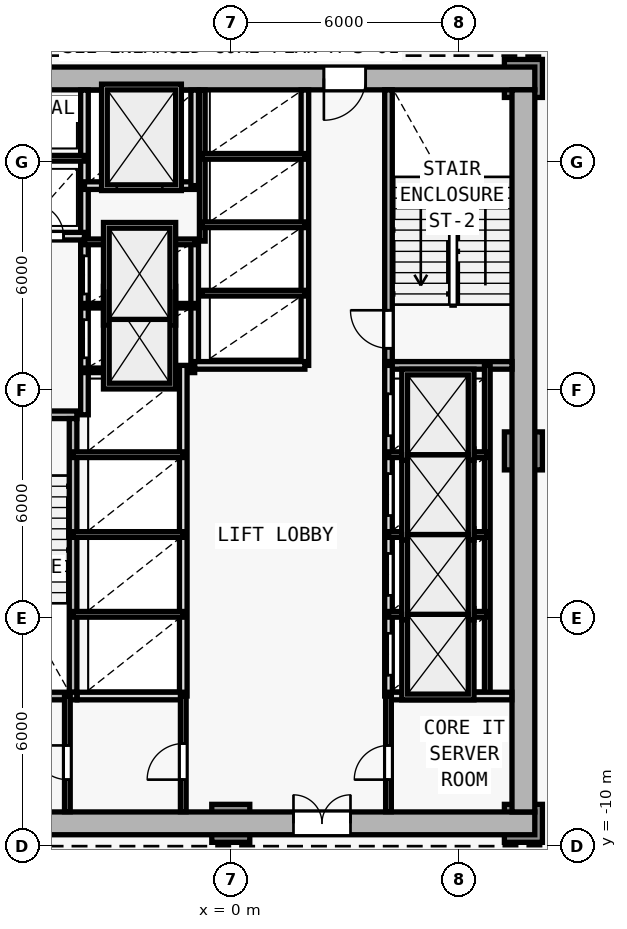
"""IFC4 building model, lengths in metres.
Left out: names, types, materials, properties, quantities, classifications, styles, units other than length and angle.
Written with IfcOpenShell. Run it as: python <this file> out.ifc"""

import sys

from ifc_helpers import new_model, si_unit, direction, frame, frame_2d, origin, origin_2d, place, context, subcontext, project, spatial, rectangle, extrude, element, fill, save


model = new_model("IFC4")
c1 = context("Model", 3, precision=1e-05, world=origin(), true_north=direction((0.0, 1.0)))
c2 = subcontext(c1, "Body", "Model", "MODEL_VIEW")
j1 = project(units=[si_unit("LENGTHUNIT", "METRE"), si_unit("PLANEANGLEUNIT", "RADIAN")], contexts=[c1])
p1 = place(None, origin())
s1 = spatial("IfcSite", under=j1, at=p1, CompositionType="ELEMENT")
p2 = place(p1, origin())
s2 = spatial("IfcBuilding", under=s1, at=p2, CompositionType="ELEMENT")
p3 = place(p2, frame((0.0, 0.0, 21.8)))
s3 = spatial("IfcBuildingStorey", under=s2, at=p3, CompositionType="ELEMENT", Elevation=21.8)
for number, where, z_axis, x_axis in (
    (1, (7.7, -9.4, 0.0), (0.0, 0.0, 1.0), (1.0, 0.0, 0.0)),
    (2, (7.7, 10.2, 0.0), (0.0, 0.0, 1.0), (1.0, 0.0, 0.0)),
    (3, (0.0, -9.4, 0.0), (0.0, 0.0, 1.0), (1.0, 0.0, 0.0)),
    (4, (7.7, 0.4, 0.0), (0.0, 0.0, 1.0), (1.0, 0.0, 0.0)),
):
    element("IfcColumn", number, at=place(p3, frame(where, z_axis=z_axis, x_axis=x_axis)), inside=s3, PredefinedType="COLUMN", context=c2, shape_type="SweptSolid", body=[
        extrude(rectangle(XDim=1.0, YDim=1.0, at=origin_2d()), origin(), (0.0, 0.0, 1.0), 4.6),
    ])
p4 = place(p3, frame((-8.0, -9.4, 0.0), z_axis=(0.0, 0.0, 1.0), x_axis=(1.0, 0.0, 0.0)))
e5 = element("IfcWall", 5, at=p4, inside=s3, PredefinedType="SHEAR", context=c2, shape_type="SweptSolid", body=[
    extrude(rectangle(XDim=16.0, YDim=0.6, at=frame_2d((8.0, 0.0))), origin(), (0.0, 0.0, 1.0), 4.35),
])
p5 = place(p4, frame((9.65, 0.0, 0.0)))
e6 = element("IfcOpeningElement", 6, at=p5, cuts=e5, PredefinedType="OPENING", context=c2, shape_type="SweptSolid", body=[
    extrude(rectangle(XDim=1.5, YDim=2.2, at=frame_2d((0.75, 1.1))), frame((0.0, 0.31, 0.0), z_axis=(0.0, -1.0, 0.0), x_axis=(1.0, 0.0, 0.0)), (0.0, 0.0, 1.0), 0.62),
])
p6 = place(p3, frame((8.0, 10.2, 0.0), z_axis=(0.0, 0.0, 1.0), x_axis=(-1.0, 0.0, 0.0)))
e7 = element("IfcWall", 7, at=p6, inside=s3, PredefinedType="SHEAR", context=c2, shape_type="SweptSolid", body=[
    extrude(rectangle(XDim=16.0, YDim=0.6, at=frame_2d((8.0, 0.0))), origin(), (0.0, 0.0, 1.0), 4.35),
])
p7 = place(p6, frame((4.45, 0.0, 0.0)))
e8 = element("IfcOpeningElement", 8, at=p7, cuts=e7, PredefinedType="OPENING", context=c2, shape_type="SweptSolid", body=[
    extrude(rectangle(XDim=1.1, YDim=2.15, at=frame_2d((0.55, 1.075))), frame((0.0, 0.31, 0.0), z_axis=(0.0, -1.0, 0.0), x_axis=(1.0, 0.0, 0.0)), (0.0, 0.0, 1.0), 0.62),
])
p8 = place(p3, frame((7.7, 9.9, 0.0), z_axis=(0.0, 0.0, 1.0), x_axis=(0.0, -1.0, 0.0)))
e9 = element("IfcWall", 9, at=p8, inside=s3, PredefinedType="SHEAR", context=c2, shape_type="SweptSolid", body=[
    extrude(rectangle(XDim=19.0, YDim=0.6, at=frame_2d((9.5, 0.0))), origin(), (0.0, 0.0, 1.0), 4.35),
])
p9 = place(p3, frame((-7.4, 1.35, 0.0), z_axis=(0.0, 0.0, 1.0), x_axis=(1.0, 0.0, 0.0)))
e10 = element("IfcWall", 10, at=p9, inside=s3, PredefinedType="SOLIDWALL", context=c2, shape_type="SweptSolid", body=[
    extrude(rectangle(XDim=3.35, YDim=0.2, at=frame_2d((1.675, 0.0))), origin(), (0.0, 0.0, 1.0), 4.35),
])
p10 = place(p9, frame((0.65, 0.0, 0.0)))
e11 = element("IfcOpeningElement", 11, at=p10, cuts=e10, PredefinedType="OPENING", context=c2, shape_type="SweptSolid", body=[
    extrude(rectangle(XDim=1.0, YDim=2.15, at=frame_2d((0.5, 1.075))), frame((0.0, 0.11, 0.0), z_axis=(0.0, -1.0, 0.0), x_axis=(1.0, 0.0, 0.0)), (0.0, 0.0, 1.0), 0.22),
])
p11 = place(p3, frame((-4.15, -5.95, 0.0), z_axis=(0.0, 0.0, 1.0), x_axis=(0.0, 1.0, 0.0)))
e12 = element("IfcWall", 12, at=p11, inside=s3, PredefinedType="SOLIDWALL", context=c2, shape_type="SweptSolid", body=[
    extrude(rectangle(XDim=7.2, YDim=0.2, at=frame_2d((3.6, 0.0))), origin(), (0.0, 0.0, 1.0), 4.35),
])
p12 = place(p3, frame((-3.85, 1.35, 0.0), z_axis=(0.0, 0.0, 1.0), x_axis=(0.0, 1.0, 0.0)))
e13 = element("IfcWall", 13, at=p12, inside=s3, PredefinedType="SOLIDWALL", context=c2, shape_type="SweptSolid", body=[
    extrude(rectangle(XDim=8.545, YDim=0.2, at=frame_2d((4.272, 0.0))), origin(), (0.0, 0.0, 1.0), 4.35),
])
p13 = place(p12, frame((1.5, 0.0, 0.0)))
e14 = element("IfcOpeningElement", 14, at=p13, cuts=e13, PredefinedType="OPENING", context=c2, shape_type="SweptSolid", body=[
    extrude(rectangle(XDim=1.0, YDim=2.15, at=frame_2d((0.5, 1.075))), frame((0.0, 0.11, 0.0), z_axis=(0.0, -1.0, 0.0), x_axis=(1.0, 0.0, 0.0)), (0.0, 0.0, 1.0), 0.22),
])
p14 = place(p12, frame((3.18, 0.0, 0.0)))
e15 = element("IfcOpeningElement", 15, at=p14, cuts=e13, PredefinedType="OPENING", context=c2, shape_type="SweptSolid", body=[
    extrude(rectangle(XDim=1.0, YDim=2.15, at=frame_2d((0.5, 1.075))), frame((0.0, 0.11, 0.0), z_axis=(0.0, -1.0, 0.0), x_axis=(1.0, 0.0, 0.0)), (0.0, 0.0, 1.0), 0.22),
])
p15 = place(p3, frame((-7.395, 6.05, 0.0), z_axis=(0.0, 0.0, 1.0), x_axis=(1.0, 0.0, 0.0)))
e16 = element("IfcWall", 16, at=p15, inside=s3, PredefinedType="SOLIDWALL", context=c2, shape_type="SweptSolid", body=[
    extrude(rectangle(XDim=3.545, YDim=0.2, at=frame_2d((1.772, 0.0))), origin(), (0.0, 0.0, 1.0), 4.35),
])
p16 = place(p15, frame((0.345, 0.0, 0.0)))
e17 = element("IfcOpeningElement", 17, at=p16, cuts=e16, PredefinedType="OPENING", context=c2, shape_type="SweptSolid", body=[
    extrude(rectangle(XDim=0.85, YDim=2.1, at=frame_2d((0.425, 1.05))), frame((0.0, 0.11, 0.0), z_axis=(0.0, -1.0, 0.0), x_axis=(1.0, 0.0, 0.0)), (0.0, 0.0, 1.0), 0.22),
])
p17 = place(p15, frame((2.145, 0.0, 0.0)))
e18 = element("IfcOpeningElement", 18, at=p17, cuts=e16, PredefinedType="OPENING", context=c2, shape_type="SweptSolid", body=[
    extrude(rectangle(XDim=0.85, YDim=2.1, at=frame_2d((0.425, 1.05))), frame((0.0, 0.11, 0.0), z_axis=(0.0, -1.0, 0.0), x_axis=(1.0, 0.0, 0.0)), (0.0, 0.0, 1.0), 0.22),
])
p18 = place(p3, frame((-7.395, 8.1, 0.0), z_axis=(0.0, 0.0, 1.0), x_axis=(1.0, 0.0, 0.0)))
e19 = element("IfcWall", 19, at=p18, inside=s3, PredefinedType="PARTITIONING", context=c2, shape_type="SweptSolid", body=[
    extrude(rectangle(XDim=3.545, YDim=0.15, at=frame_2d((1.772, 0.0))), origin(), (0.0, 0.0, 1.0), 4.35),
])
p19 = place(p3, frame((4.15, 2.75, 0.0), z_axis=(0.0, 0.0, 1.0), x_axis=(0.0, 1.0, 0.0)))
e20 = element("IfcWall", 20, at=p19, inside=s3, PredefinedType="SOLIDWALL", context=c2, shape_type="SweptSolid", body=[
    extrude(rectangle(XDim=7.15, YDim=0.2, at=frame_2d((3.575, 0.0))), origin(), (0.0, 0.0, 1.0), 4.35),
])
p20 = place(p19, frame((0.35, 0.0, 0.0)))
e21 = element("IfcOpeningElement", 21, at=p20, cuts=e20, PredefinedType="OPENING", context=c2, shape_type="SweptSolid", body=[
    extrude(rectangle(XDim=1.0, YDim=2.15, at=frame_2d((0.5, 1.075))), frame((0.0, 0.11, 0.0), z_axis=(0.0, -1.0, 0.0), x_axis=(1.0, 0.0, 0.0)), (0.0, 0.0, 1.0), 0.22),
])
p21 = place(p3, frame((4.05, 2.65, 0.0), z_axis=(0.0, 0.0, 1.0), x_axis=(1.0, 0.0, 0.0)))
e22 = element("IfcWall", 22, at=p21, inside=s3, PredefinedType="SOLIDWALL", context=c2, shape_type="SweptSolid", body=[
    extrude(rectangle(XDim=3.35, YDim=0.2, at=frame_2d((1.675, 0.0))), origin(), (0.0, 0.0, 1.0), 4.35),
])
p22 = place(p3, frame((-0.95, 2.65, 0.0), z_axis=(0.0, 0.0, 1.0), x_axis=(0.0, 1.0, 0.0)))
e23 = element("IfcWall", 23, at=p22, inside=s3, PredefinedType="SOLIDWALL", context=c2, shape_type="SweptSolid", body=[
    extrude(rectangle(XDim=3.27, YDim=0.2, at=frame_2d((1.635, 0.0))), origin(), (0.0, 0.0, 1.0), 4.35),
])
for number, where, z_axis, x_axis in (
    (24, (-3.85, 2.52, 0.0), (0.0, 0.0, 1.0), (1.0, 0.0, 0.0)),
    (25, (-3.85, 4.22, 0.0), (0.0, 0.0, 1.0), (1.0, 0.0, 0.0)),
):
    element("IfcWall", number, at=place(p3, frame(where, z_axis=z_axis, x_axis=x_axis)), inside=s3, PredefinedType="PARTITIONING", context=c2, shape_type="SweptSolid", body=[
        extrude(rectangle(XDim=2.9, YDim=0.12, at=frame_2d((1.45, 0.0))), origin(), (0.0, 0.0, 1.0), 4.35),
    ])
p23 = place(p3, frame((-3.85, 5.9, 0.0), z_axis=(0.0, 0.0, 1.0), x_axis=(1.0, 0.0, 0.0)))
e26 = element("IfcWall", 26, at=p23, inside=s3, PredefinedType="PARTITIONING", context=c2, shape_type="SweptSolid", body=[
    extrude(rectangle(XDim=2.9, YDim=0.15, at=frame_2d((1.45, 0.0))), origin(), (0.0, 0.0, 1.0), 4.35),
])
p24 = place(p3, frame((-3.85, 7.38, 0.0), z_axis=(0.0, 0.0, 1.0), x_axis=(1.0, 0.0, 0.0)))
e27 = element("IfcWall", 27, at=p24, inside=s3, PredefinedType="SOLIDWALL", context=c2, shape_type="SweptSolid", body=[
    extrude(rectangle(XDim=2.9, YDim=0.2, at=frame_2d((1.45, 0.0))), origin(), (0.0, 0.0, 1.0), 4.35),
])
p25 = place(p24, frame((0.85, 0.0, 0.0)))
e28 = element("IfcOpeningElement", 28, at=p25, cuts=e27, PredefinedType="OPENING", context=c2, shape_type="SweptSolid", body=[
    extrude(rectangle(XDim=1.2, YDim=2.2, at=frame_2d((0.6, 1.1))), frame((0.0, 0.11, 0.0), z_axis=(0.0, -1.0, 0.0), x_axis=(1.0, 0.0, 0.0)), (0.0, 0.0, 1.0), 0.22),
])
p26 = place(p3, frame((-0.95, 7.38, 0.0), z_axis=(0.0, 0.0, 1.0), x_axis=(0.0, 1.0, 0.0)))
e29 = element("IfcWall", 29, at=p26, inside=s3, PredefinedType="SOLIDWALL", context=c2, shape_type="SweptSolid", body=[
    extrude(rectangle(XDim=2.515, YDim=0.2, at=frame_2d((1.258, 0.0))), origin(), (0.0, 0.0, 1.0), 4.35),
])
p27 = place(p3, frame((4.15, -6.05, 0.0), z_axis=(0.0, 0.0, 1.0), x_axis=(0.0, 1.0, 0.0)))
e30 = element("IfcWall", 30, at=p27, inside=s3, PredefinedType="SOLIDWALL", context=c2, shape_type="SweptSolid", body=[
    extrude(rectangle(XDim=8.7, YDim=0.2, at=frame_2d((4.35, 0.0))), origin(), (0.0, 0.0, 1.0), 4.35),
])
p28 = place(p27, frame((0.55, 0.0, 0.0)))
e31 = element("IfcOpeningElement", 31, at=p28, cuts=e30, PredefinedType="OPENING", context=c2, shape_type="SweptSolid", body=[
    extrude(rectangle(XDim=1.1, YDim=2.15, at=frame_2d((0.55, 1.075))), frame((0.0, 0.11, 0.0), z_axis=(0.0, -1.0, 0.0), x_axis=(1.0, 0.0, 0.0)), (0.0, 0.0, 1.0), 0.22),
])
p29 = place(p27, frame((2.65, 0.0, 0.0)))
e32 = element("IfcOpeningElement", 32, at=p29, cuts=e30, PredefinedType="OPENING", context=c2, shape_type="SweptSolid", body=[
    extrude(rectangle(XDim=1.1, YDim=2.15, at=frame_2d((0.55, 1.075))), frame((0.0, 0.11, 0.0), z_axis=(0.0, -1.0, 0.0), x_axis=(1.0, 0.0, 0.0)), (0.0, 0.0, 1.0), 0.22),
])
p30 = place(p27, frame((4.75, 0.0, 0.0)))
e33 = element("IfcOpeningElement", 33, at=p30, cuts=e30, PredefinedType="OPENING", context=c2, shape_type="SweptSolid", body=[
    extrude(rectangle(XDim=1.1, YDim=2.15, at=frame_2d((0.55, 1.075))), frame((0.0, 0.11, 0.0), z_axis=(0.0, -1.0, 0.0), x_axis=(1.0, 0.0, 0.0)), (0.0, 0.0, 1.0), 0.22),
])
p31 = place(p27, frame((6.85, 0.0, 0.0)))
e34 = element("IfcOpeningElement", 34, at=p31, cuts=e30, PredefinedType="OPENING", context=c2, shape_type="SweptSolid", body=[
    extrude(rectangle(XDim=1.1, YDim=2.15, at=frame_2d((0.55, 1.075))), frame((0.0, 0.11, 0.0), z_axis=(0.0, -1.0, 0.0), x_axis=(1.0, 0.0, 0.0)), (0.0, 0.0, 1.0), 0.22),
])
p32 = place(p3, frame((6.75, -6.05, 0.0), z_axis=(0.0, 0.0, 1.0), x_axis=(0.0, 1.0, 0.0)))
e35 = element("IfcWall", 35, at=p32, inside=s3, PredefinedType="PARTITIONING", context=c2, shape_type="SweptSolid", body=[
    extrude(rectangle(XDim=8.7, YDim=0.15, at=frame_2d((4.35, 0.0))), origin(), (0.0, 0.0, 1.0), 4.35),
])
for number, where, z_axis, x_axis in (
    (36, (4.15, -3.9, 0.0), (0.0, 0.0, 1.0), (1.0, 0.0, 0.0)),
    (37, (4.15, -1.8, 0.0), (0.0, 0.0, 1.0), (1.0, 0.0, 0.0)),
    (38, (4.15, 0.3, 0.0), (0.0, 0.0, 1.0), (1.0, 0.0, 0.0)),
):
    element("IfcWall", number, at=place(p3, frame(where, z_axis=z_axis, x_axis=x_axis)), inside=s3, PredefinedType="PARTITIONING", context=c2, shape_type="SweptSolid", body=[
        extrude(rectangle(XDim=2.6, YDim=0.15, at=frame_2d((1.3, 0.0))), origin(), (0.0, 0.0, 1.0), 4.35),
    ])
p33 = place(p3, frame((-1.25, -6.05, 0.0), z_axis=(0.0, 0.0, 1.0), x_axis=(0.0, 1.0, 0.0)))
e39 = element("IfcWall", 39, at=p33, inside=s3, PredefinedType="SOLIDWALL", context=c2, shape_type="SweptSolid", body=[
    extrude(rectangle(XDim=8.7, YDim=0.2, at=frame_2d((4.35, 0.0))), origin(), (0.0, 0.0, 1.0), 4.35),
])
for number, where, z_axis, x_axis in (
    (40, (-4.15, -3.9, 0.0), (0.0, 0.0, 1.0), (1.0, 0.0, 0.0)),
    (41, (-4.15, -1.8, 0.0), (0.0, 0.0, 1.0), (1.0, 0.0, 0.0)),
    (42, (-4.15, 0.3, 0.0), (0.0, 0.0, 1.0), (1.0, 0.0, 0.0)),
):
    element("IfcWall", number, at=place(p3, frame(where, z_axis=z_axis, x_axis=x_axis)), inside=s3, PredefinedType="PARTITIONING", context=c2, shape_type="SweptSolid", body=[
        extrude(rectangle(XDim=2.9, YDim=0.15, at=frame_2d((1.45, 0.0))), origin(), (0.0, 0.0, 1.0), 4.35),
    ])
p34 = place(p3, frame((1.95, 2.65, 0.0), z_axis=(0.0, 0.0, 1.0), x_axis=(0.0, 1.0, 0.0)))
e43 = element("IfcWall", 43, at=p34, inside=s3, PredefinedType="SOLIDWALL", context=c2, shape_type="SweptSolid", body=[
    extrude(rectangle(XDim=7.245, YDim=0.2, at=frame_2d((3.623, 0.0))), origin(), (0.0, 0.0, 1.0), 4.35),
])
p35 = place(p3, frame((-0.95, 2.65, 0.0), z_axis=(0.0, 0.0, 1.0), x_axis=(1.0, 0.0, 0.0)))
e44 = element("IfcWall", 44, at=p35, inside=s3, PredefinedType="SOLIDWALL", context=c2, shape_type="SweptSolid", body=[
    extrude(rectangle(XDim=2.9, YDim=0.2, at=frame_2d((1.45, 0.0))), origin(), (0.0, 0.0, 1.0), 4.35),
])
p36 = place(p3, frame((-0.75, 5.92, 0.0), z_axis=(0.0, 0.0, 1.0), x_axis=(0.0, 1.0, 0.0)))
e45 = element("IfcWall", 45, at=p36, inside=s3, PredefinedType="PARTITIONING", context=c2, shape_type="SweptSolid", body=[
    extrude(rectangle(XDim=3.975, YDim=0.15, at=frame_2d((1.988, 0.0))), origin(), (0.0, 0.0, 1.0), 4.35),
])
for number, where, z_axis, x_axis in (
    (46, (-0.75, 4.55, 0.0), (0.0, 0.0, 1.0), (1.0, 0.0, 0.0)),
    (47, (-0.75, 6.35, 0.0), (0.0, 0.0, 1.0), (1.0, 0.0, 0.0)),
    (48, (-0.75, 8.15, 0.0), (0.0, 0.0, 1.0), (1.0, 0.0, 0.0)),
):
    element("IfcWall", number, at=place(p3, frame(where, z_axis=z_axis, x_axis=x_axis)), inside=s3, PredefinedType="PARTITIONING", context=c2, shape_type="SweptSolid", body=[
        extrude(rectangle(XDim=2.7, YDim=0.15, at=frame_2d((1.35, 0.0))), origin(), (0.0, 0.0, 1.0), 4.35),
    ])
p37 = place(p3, frame((-7.4, -6.05, 0.0), z_axis=(0.0, 0.0, 1.0), x_axis=(1.0, 0.0, 0.0)))
e49 = element("IfcWall", 49, at=p37, inside=s3, PredefinedType="SOLIDWALL", context=c2, shape_type="SweptSolid", body=[
    extrude(rectangle(XDim=3.35, YDim=0.2, at=frame_2d((1.675, 0.0))), origin(), (0.0, 0.0, 1.0), 4.35),
])
p38 = place(p3, frame((-4.04, -6.05, 0.0), z_axis=(0.0, 0.0, 1.0), x_axis=(1.0, 0.0, 0.0)))
e50 = element("IfcWall", 50, at=p38, inside=s3, PredefinedType="SOLIDWALL", context=c2, shape_type="SweptSolid", body=[
    extrude(rectangle(XDim=2.79, YDim=0.2, at=frame_2d((1.395, 0.0))), origin(), (0.0, 0.0, 1.0), 4.35),
])
p39 = place(p3, frame((4.15, -6.05, 0.0), z_axis=(0.0, 0.0, 1.0), x_axis=(1.0, 0.0, 0.0)))
e51 = element("IfcWall", 51, at=p39, inside=s3, PredefinedType="SOLIDWALL", context=c2, shape_type="SweptSolid", body=[
    extrude(rectangle(XDim=3.245, YDim=0.2, at=frame_2d((1.623, 0.0))), origin(), (0.0, 0.0, 1.0), 4.35),
])
p40 = place(p3, frame((-1.25, -9.095, 0.0), z_axis=(0.0, 0.0, 1.0), x_axis=(0.0, 1.0, 0.0)))
e52 = element("IfcWall", 52, at=p40, inside=s3, PredefinedType="PARTITIONING", context=c2, shape_type="SweptSolid", body=[
    extrude(rectangle(XDim=3.045, YDim=0.15, at=frame_2d((1.522, 0.0))), origin(), (0.0, 0.0, 1.0), 4.35),
])
p41 = place(p40, frame((0.845, 0.0, 0.0)))
e53 = element("IfcOpeningElement", 53, at=p41, cuts=e52, PredefinedType="OPENING", context=c2, shape_type="SweptSolid", body=[
    extrude(rectangle(XDim=0.95, YDim=2.1, at=frame_2d((0.475, 1.05))), frame((0.0, 0.085, 0.0), z_axis=(0.0, -1.0, 0.0), x_axis=(1.0, 0.0, 0.0)), (0.0, 0.0, 1.0), 0.17),
])
p42 = place(p3, frame((4.15, -9.095, 0.0), z_axis=(0.0, 0.0, 1.0), x_axis=(0.0, 1.0, 0.0)))
e54 = element("IfcWall", 54, at=p42, inside=s3, PredefinedType="PARTITIONING", context=c2, shape_type="SweptSolid", body=[
    extrude(rectangle(XDim=3.045, YDim=0.15, at=frame_2d((1.522, 0.0))), origin(), (0.0, 0.0, 1.0), 4.35),
])
p43 = place(p42, frame((0.845, 0.0, 0.0)))
e55 = element("IfcOpeningElement", 55, at=p43, cuts=e54, PredefinedType="OPENING", context=c2, shape_type="SweptSolid", body=[
    extrude(rectangle(XDim=0.9, YDim=2.1, at=frame_2d((0.45, 1.05))), frame((0.0, 0.085, 0.0), z_axis=(0.0, -1.0, 0.0), x_axis=(1.0, 0.0, 0.0)), (0.0, 0.0, 1.0), 0.17),
])
p44 = place(p3, frame((-4.3, -9.095, 0.0), z_axis=(0.0, 0.0, 1.0), x_axis=(0.0, 1.0, 0.0)))
e56 = element("IfcWall", 56, at=p44, inside=s3, PredefinedType="PARTITIONING", context=c2, shape_type="SweptSolid", body=[
    extrude(rectangle(XDim=3.045, YDim=0.15, at=frame_2d((1.522, 0.0))), origin(), (0.0, 0.0, 1.0), 4.35),
])
p45 = place(p44, frame((0.845, 0.0, 0.0)))
e57 = element("IfcOpeningElement", 57, at=p45, cuts=e56, PredefinedType="OPENING", context=c2, shape_type="SweptSolid", body=[
    extrude(rectangle(XDim=0.9, YDim=2.1, at=frame_2d((0.45, 1.05))), frame((0.0, 0.085, 0.0), z_axis=(0.0, -1.0, 0.0), x_axis=(1.0, 0.0, 0.0)), (0.0, 0.0, 1.0), 0.17),
])
p46 = place(p5, origin())
e58 = element("IfcDoor", 58, at=p46, inside=s3, OperationType="DOUBLE_DOOR_SINGLE_SWING", PredefinedType="DOOR", context=c2, shape_type="SweptSolid", body=[
    extrude(rectangle(XDim=1.5, YDim=2.2, at=frame_2d((0.75, 1.1))), frame((0.0, 0.025, 0.0), z_axis=(0.0, -1.0, 0.0), x_axis=(1.0, 0.0, 0.0)), (0.0, 0.0, 1.0), 0.05),
])
fill(e6, e58)
p47 = place(p7, origin())
e59 = element("IfcDoor", 59, at=p47, inside=s3, OperationType="SINGLE_SWING_RIGHT", PredefinedType="DOOR", context=c2, shape_type="SweptSolid", body=[
    extrude(rectangle(XDim=1.1, YDim=2.15, at=frame_2d((0.55, 1.075))), frame((0.0, 0.025, 0.0), z_axis=(0.0, -1.0, 0.0), x_axis=(1.0, 0.0, 0.0)), (0.0, 0.0, 1.0), 0.05),
])
fill(e8, e59)
p48 = place(p17, origin())
e60 = element("IfcDoor", 60, at=p48, inside=s3, OperationType="SINGLE_SWING_LEFT", PredefinedType="DOOR", context=c2, shape_type="SweptSolid", body=[
    extrude(rectangle(XDim=0.85, YDim=2.1, at=frame_2d((0.425, 1.05))), frame((0.0, 0.025, 0.0), z_axis=(0.0, -1.0, 0.0), x_axis=(1.0, 0.0, 0.0)), (0.0, 0.0, 1.0), 0.05),
])
fill(e18, e60)
p49 = place(p20, origin())
e61 = element("IfcDoor", 61, at=p49, inside=s3, OperationType="SINGLE_SWING_RIGHT", PredefinedType="DOOR", context=c2, shape_type="SweptSolid", body=[
    extrude(rectangle(XDim=1.0, YDim=2.15, at=frame_2d((0.5, 1.075))), frame((0.0, 0.025, 0.0), z_axis=(0.0, -1.0, 0.0), x_axis=(1.0, 0.0, 0.0)), (0.0, 0.0, 1.0), 0.05),
])
fill(e21, e61)
p50 = place(p25, origin())
e62 = element("IfcDoor", 62, at=p50, inside=s3, OperationType="DOUBLE_DOOR_SLIDING", PredefinedType="DOOR", context=c2, shape_type="SweptSolid", body=[
    extrude(rectangle(XDim=1.2, YDim=2.2, at=frame_2d((0.6, 1.1))), frame((0.0, 0.025, 0.0), z_axis=(0.0, -1.0, 0.0), x_axis=(1.0, 0.0, 0.0)), (0.0, 0.0, 1.0), 0.05),
])
fill(e28, e62)
p51 = place(p28, origin())
e63 = element("IfcDoor", 63, at=p51, inside=s3, OperationType="DOUBLE_DOOR_SLIDING", PredefinedType="DOOR", context=c2, shape_type="SweptSolid", body=[
    extrude(rectangle(XDim=1.1, YDim=2.15, at=frame_2d((0.55, 1.075))), frame((0.0, 0.025, 0.0), z_axis=(0.0, -1.0, 0.0), x_axis=(1.0, 0.0, 0.0)), (0.0, 0.0, 1.0), 0.05),
])
fill(e31, e63)
p52 = place(p29, origin())
e64 = element("IfcDoor", 64, at=p52, inside=s3, OperationType="DOUBLE_DOOR_SLIDING", PredefinedType="DOOR", context=c2, shape_type="SweptSolid", body=[
    extrude(rectangle(XDim=1.1, YDim=2.15, at=frame_2d((0.55, 1.075))), frame((0.0, 0.025, 0.0), z_axis=(0.0, -1.0, 0.0), x_axis=(1.0, 0.0, 0.0)), (0.0, 0.0, 1.0), 0.05),
])
fill(e32, e64)
p53 = place(p30, origin())
e65 = element("IfcDoor", 65, at=p53, inside=s3, OperationType="DOUBLE_DOOR_SLIDING", PredefinedType="DOOR", context=c2, shape_type="SweptSolid", body=[
    extrude(rectangle(XDim=1.1, YDim=2.15, at=frame_2d((0.55, 1.075))), frame((0.0, 0.025, 0.0), z_axis=(0.0, -1.0, 0.0), x_axis=(1.0, 0.0, 0.0)), (0.0, 0.0, 1.0), 0.05),
])
fill(e33, e65)
p54 = place(p31, origin())
e66 = element("IfcDoor", 66, at=p54, inside=s3, OperationType="DOUBLE_DOOR_SLIDING", PredefinedType="DOOR", context=c2, shape_type="SweptSolid", body=[
    extrude(rectangle(XDim=1.1, YDim=2.15, at=frame_2d((0.55, 1.075))), frame((0.0, 0.025, 0.0), z_axis=(0.0, -1.0, 0.0), x_axis=(1.0, 0.0, 0.0)), (0.0, 0.0, 1.0), 0.05),
])
fill(e34, e66)
p55 = place(p13, origin())
e67 = element("IfcDoor", 67, at=p55, inside=s3, OperationType="DOUBLE_DOOR_SLIDING", PredefinedType="DOOR", context=c2, shape_type="SweptSolid", body=[
    extrude(rectangle(XDim=1.0, YDim=2.15, at=frame_2d((0.5, 1.075))), frame((0.0, 0.025, 0.0), z_axis=(0.0, -1.0, 0.0), x_axis=(1.0, 0.0, 0.0)), (0.0, 0.0, 1.0), 0.05),
])
fill(e14, e67)
p56 = place(p14, origin())
e68 = element("IfcDoor", 68, at=p56, inside=s3, OperationType="DOUBLE_DOOR_SLIDING", PredefinedType="DOOR", context=c2, shape_type="SweptSolid", body=[
    extrude(rectangle(XDim=1.0, YDim=2.15, at=frame_2d((0.5, 1.075))), frame((0.0, 0.025, 0.0), z_axis=(0.0, -1.0, 0.0), x_axis=(1.0, 0.0, 0.0)), (0.0, 0.0, 1.0), 0.05),
])
fill(e15, e68)
p57 = place(p41, origin())
e69 = element("IfcDoor", 69, at=p57, inside=s3, OperationType="SINGLE_SWING_LEFT", PredefinedType="DOOR", context=c2, shape_type="SweptSolid", body=[
    extrude(rectangle(XDim=0.95, YDim=2.1, at=frame_2d((0.475, 1.05))), frame((0.0, 0.025, 0.0), z_axis=(0.0, -1.0, 0.0), x_axis=(1.0, 0.0, 0.0)), (0.0, 0.0, 1.0), 0.05),
])
fill(e53, e69)
p58 = place(p45, origin())
e70 = element("IfcDoor", 70, at=p58, inside=s3, OperationType="SINGLE_SWING_RIGHT", PredefinedType="DOOR", context=c2, shape_type="SweptSolid", body=[
    extrude(rectangle(XDim=0.9, YDim=2.1, at=frame_2d((0.45, 1.05))), frame((0.0, 0.025, 0.0), z_axis=(0.0, -1.0, 0.0), x_axis=(1.0, 0.0, 0.0)), (0.0, 0.0, 1.0), 0.05),
])
fill(e57, e70)
p59 = place(p43, origin())
e71 = element("IfcDoor", 71, at=p59, inside=s3, OperationType="SINGLE_SWING_LEFT", PredefinedType="DOOR", context=c2, shape_type="SweptSolid", body=[
    extrude(rectangle(XDim=0.9, YDim=2.1, at=frame_2d((0.45, 1.05))), frame((0.0, 0.025, 0.0), z_axis=(0.0, -1.0, 0.0), x_axis=(1.0, 0.0, 0.0)), (0.0, 0.0, 1.0), 0.05),
])
fill(e55, e71)
save(model, sys.argv[1])
